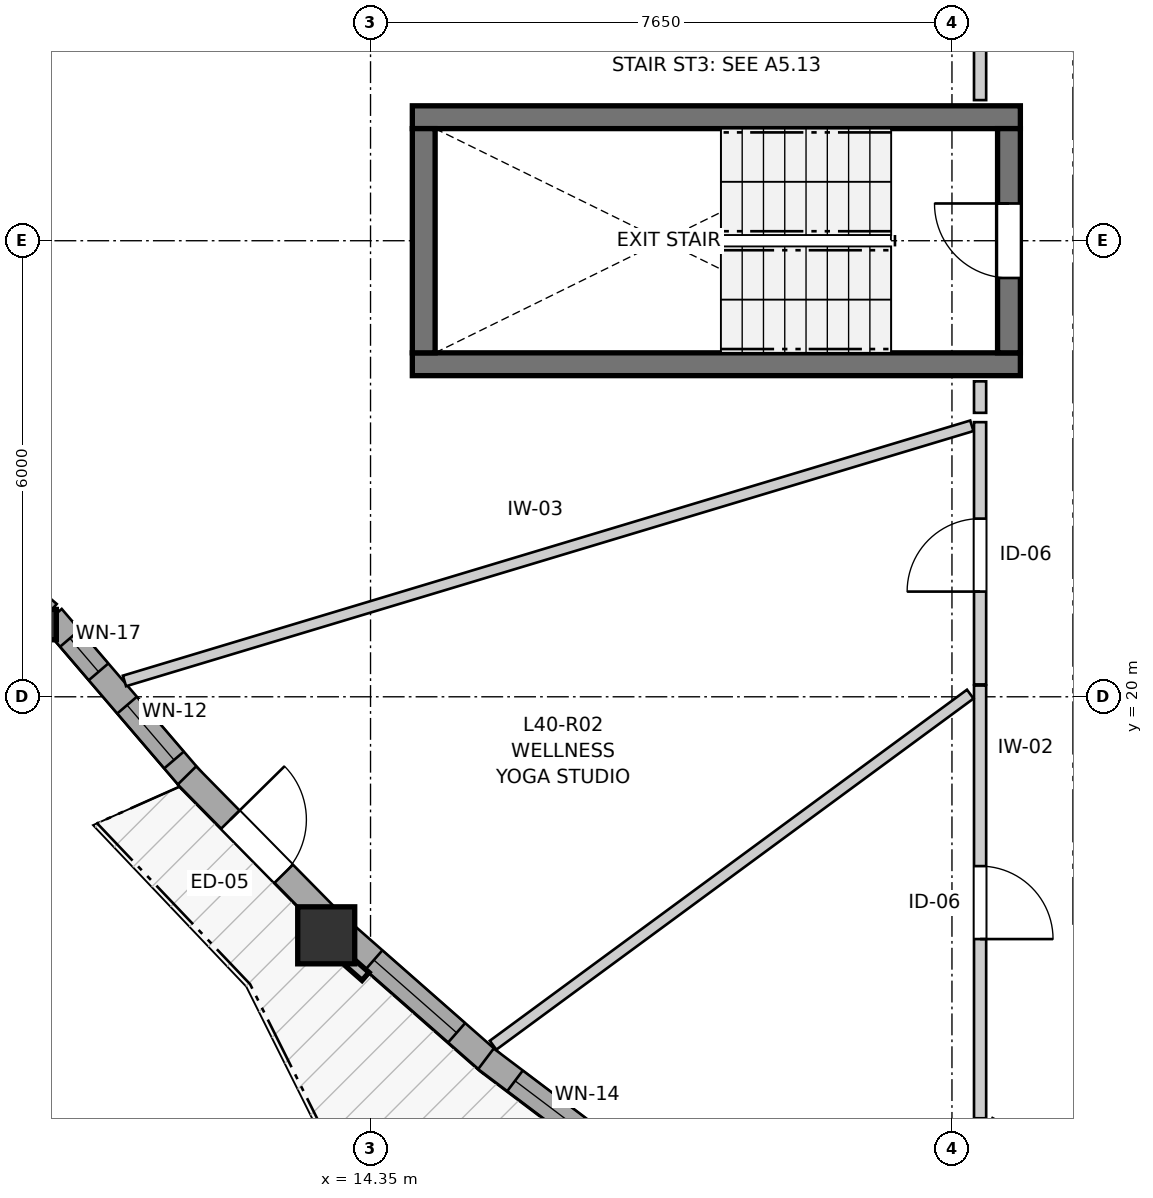
"""IFC4 building model, lengths in metres.
Left out: names, types, materials, properties, quantities, classifications, styles, units other than length and angle.
Written with IfcOpenShell. Run it as: python <this file> out.ifc"""

import sys

from ifc_helpers import new_model, si_unit, direction, frame, frame_2d, origin, origin_2d, place, context, subcontext, project, spatial, rectangle, i_section, extrude, source, transform, mapped, element, fill, save


model = new_model("IFC4")
c1 = context("Model", 3, precision=1e-05, world=origin(), true_north=direction((0.0, 1.0)))
c2 = subcontext(c1, "Body", "Model", "MODEL_VIEW")
j1 = project(units=[si_unit("LENGTHUNIT", "METRE"), si_unit("PLANEANGLEUNIT", "RADIAN")], contexts=[c1])
p1 = place(None, origin())
s1 = spatial("IfcSite", under=j1, at=p1, CompositionType="ELEMENT")
p2 = place(p1, origin())
s2 = spatial("IfcBuilding", under=s1, at=p2, CompositionType="ELEMENT")
p3 = place(p2, frame((0.0, 0.0, 136.2)))
s3 = spatial("IfcBuildingStorey", under=s2, at=p3, CompositionType="ELEMENT", Elevation=136.2)
for number, where, z_axis, x_axis in (
    (1, (14.9, 24.375, 0.0), (0.0, 0.0, 1.0), (1.0, 0.0, 0.0)),
    (2, (22.9, 27.625, 0.0), (0.0, 0.0, 1.0), (-1.0, 0.0, 0.0)),
):
    element("IfcWall", number, at=place(p3, frame(where, z_axis=z_axis, x_axis=x_axis)), inside=s3, PredefinedType="SHEAR", context=c2, shape_type="SweptSolid", body=[
        extrude(rectangle(XDim=8.0, YDim=0.3, at=frame_2d((4.0, 0.0))), origin(), (0.0, 0.0, 1.0), 2.95),
    ])
p4 = place(p3, frame((15.05, 27.475, 0.0), z_axis=(0.0, 0.0, 1.0), x_axis=(0.0, -1.0, 0.0)))
e3 = element("IfcWall", 3, at=p4, inside=s3, PredefinedType="SHEAR", context=c2, shape_type="SweptSolid", body=[
    extrude(rectangle(XDim=2.95, YDim=0.3, at=frame_2d((1.475, 0.0))), origin(), (0.0, 0.0, 1.0), 2.95),
])
p5 = place(p3, frame((22.75, 24.525, 0.0), z_axis=(0.0, 0.0, 1.0), x_axis=(0.0, 1.0, 0.0)))
e4 = element("IfcWall", 4, at=p5, inside=s3, PredefinedType="SHEAR", context=c2, shape_type="SweptSolid", body=[
    extrude(rectangle(XDim=2.95, YDim=0.3, at=frame_2d((1.475, 0.0))), origin(), (0.0, 0.0, 1.0), 2.95),
])
p6 = place(p5, frame((0.985, 0.0, 0.0)))
e5 = element("IfcOpeningElement", 5, at=p6, cuts=e4, PredefinedType="OPENING", context=c2, shape_type="SweptSolid", body=[
    extrude(rectangle(XDim=0.98, YDim=2.15, at=frame_2d((0.49, 1.075))), frame((0.0, 0.16, 0.0), z_axis=(0.0, -1.0, 0.0), x_axis=(1.0, 0.0, 0.0)), (0.0, 0.0, 1.0), 0.32),
])
m1 = source(origin(), c2, "Body", "SweptSolid", [
    extrude(i_section(OverallWidth=0.401, OverallDepth=0.399, WebThickness=0.023, FlangeThickness=0.036, FilletRadius=0.015, at=origin_2d()), origin(), (0.0, 0.0, 1.0), 2.95),
])
p7 = place(p3, frame((10.016, 20.95, 0.0), z_axis=(0.0, 0.0, 1.0), x_axis=(1.0, 0.0, 0.0)))
e6 = element("IfcColumn", 6, at=p7, inside=s3, PredefinedType="PILASTER", context=c2, shape_type="MappedRepresentation", body=[
    mapped(m1, transform((0.0, 0.0, 0.0), x_axis=(1.0, 0.0, 0.0), y_axis=(0.0, 1.0, 0.0), z_axis=(0.0, 0.0, 1.0), scale=1.0)),
])
m2 = source(origin(), c2, "Body", "SweptSolid", [
    extrude(rectangle(XDim=0.75, YDim=0.75, at=origin_2d()), origin(), (0.0, 0.0, 1.0), 2.95),
])
p8 = place(p3, frame((13.767, 16.862, 0.0), z_axis=(0.0, 0.0, 1.0), x_axis=(1.0, 0.0, 0.0)))
e7 = element("IfcColumn", 7, at=p8, inside=s3, PredefinedType="COLUMN", context=c2, shape_type="MappedRepresentation", body=[
    mapped(m2, transform((0.0, 0.0, 0.0), x_axis=(1.0, 0.0, 0.0), y_axis=(0.0, 1.0, 0.0), z_axis=(0.0, 0.0, 1.0), scale=1.0)),
])
p9 = place(p3, frame((8.573, 22.406, 0.0), z_axis=(0.0, 0.0, 1.0), x_axis=(0.760379886087, -0.649478582276, 0.0)))
e8 = element("IfcWall", 8, at=p9, inside=s3, PredefinedType="SOLIDWALL", context=c2, shape_type="SweptSolid", body=[
    extrude(rectangle(XDim=2.023, YDim=0.34, at=frame_2d((1.012, 0.0))), origin(), (0.0, 0.0, 1.0), 2.53),
])
p10 = place(p9, frame((0.322, 0.0, 0.82)))
e9 = element("IfcOpeningElement", 9, at=p10, cuts=e8, PredefinedType="OPENING", context=c2, shape_type="SweptSolid", body=[
    extrude(rectangle(XDim=1.4, YDim=1.35, at=frame_2d((0.7, 0.675))), frame((0.0, 0.18, 0.0), z_axis=(0.0, -1.0, 0.0), x_axis=(1.0, 0.0, 0.0)), (0.0, 0.0, 1.0), 0.36),
])
p11 = place(p3, frame((10.158, 21.045, 0.0), z_axis=(0.0, 0.0, 1.0), x_axis=(0.650385352329, -0.759604432238, 0.0)))
e10 = element("IfcWall", 10, at=p11, inside=s3, PredefinedType="SOLIDWALL", context=c2, shape_type="SweptSolid", body=[
    extrude(rectangle(XDim=2.823, YDim=0.34, at=frame_2d((1.412, 0.0))), origin(), (0.0, 0.0, 1.0), 2.53),
])
p12 = place(p11, frame((0.364, 0.0, 0.82)))
e11 = element("IfcOpeningElement", 11, at=p12, cuts=e10, PredefinedType="OPENING", context=c2, shape_type="SweptSolid", body=[
    extrude(rectangle(XDim=0.58, YDim=1.35, at=frame_2d((0.29, 0.675))), frame((0.0, 0.18, 0.0), z_axis=(0.0, -1.0, 0.0), x_axis=(1.0, 0.0, 0.0)), (0.0, 0.0, 1.0), 0.36),
])
p13 = place(p11, frame((1.52, 0.0, 0.82)))
e12 = element("IfcOpeningElement", 12, at=p13, cuts=e10, PredefinedType="OPENING", context=c2, shape_type="SweptSolid", body=[
    extrude(rectangle(XDim=0.95, YDim=1.35, at=frame_2d((0.475, 0.675))), frame((0.0, 0.18, 0.0), z_axis=(0.0, -1.0, 0.0), x_axis=(1.0, 0.0, 0.0)), (0.0, 0.0, 1.0), 0.36),
])
p14 = place(p3, frame((11.935, 18.965, 0.0), z_axis=(0.0, 0.0, 1.0), x_axis=(0.701560003197, -0.712610385775, 0.0)))
e13 = element("IfcWall", 13, at=p14, inside=s3, PredefinedType="SOLIDWALL", context=c2, shape_type="SweptSolid", body=[
    extrude(rectangle(XDim=2.629, YDim=0.34, at=frame_2d((1.314, 0.0))), origin(), (0.0, 0.0, 1.0), 2.53),
])
p15 = place(p14, frame((0.815, 0.0, 0.0)))
e14 = element("IfcOpeningElement", 14, at=p15, cuts=e13, PredefinedType="OPENING", context=c2, shape_type="SweptSolid", body=[
    extrude(rectangle(XDim=1.0, YDim=2.1, at=frame_2d((0.5, 1.05))), frame((0.0, 0.18, 0.0), z_axis=(0.0, -1.0, 0.0), x_axis=(1.0, 0.0, 0.0)), (0.0, 0.0, 1.0), 0.36),
])
p16 = place(p3, frame((13.996, 16.887, 0.0), z_axis=(0.0, 0.0, 1.0), x_axis=(0.75116489845, -0.660114607729, 0.0)))
e15 = element("IfcWall", 15, at=p16, inside=s3, PredefinedType="SOLIDWALL", context=c2, shape_type="SweptSolid", body=[
    extrude(rectangle(XDim=2.585, YDim=0.34, at=frame_2d((1.292, 0.0))), origin(), (0.0, 0.0, 1.0), 2.53),
])
p17 = place(p16, frame((0.531, 0.0, 0.82)))
e16 = element("IfcOpeningElement", 16, at=p17, cuts=e15, PredefinedType="OPENING", context=c2, shape_type="SweptSolid", body=[
    extrude(rectangle(XDim=1.45, YDim=1.25, at=frame_2d((0.725, 0.625))), frame((0.0, 0.18, 0.0), z_axis=(0.0, -1.0, 0.0), x_axis=(1.0, 0.0, 0.0)), (0.0, 0.0, 1.0), 0.36),
])
p18 = place(p3, frame((15.868, 15.237, 0.0), z_axis=(0.0, 0.0, 1.0), x_axis=(0.798078784288, -0.602553113069, 0.0)))
e17 = element("IfcWall", 17, at=p18, inside=s3, PredefinedType="SOLIDWALL", context=c2, shape_type="SweptSolid", body=[
    extrude(rectangle(XDim=2.689, YDim=0.34, at=frame_2d((1.345, 0.0))), origin(), (0.0, 0.0, 1.0), 2.53),
])
p19 = place(p18, frame((0.48, 0.0, 0.82)))
e18 = element("IfcOpeningElement", 18, at=p19, cuts=e17, PredefinedType="OPENING", context=c2, shape_type="SweptSolid", body=[
    extrude(rectangle(XDim=1.75, YDim=1.3, at=frame_2d((0.875, 0.65))), frame((0.0, 0.18, 0.0), z_axis=(0.0, -1.0, 0.0), x_axis=(1.0, 0.0, 0.0)), (0.0, 0.0, 1.0), 0.36),
])
p20 = place(p3, frame((22.37, 20.148, 0.0), z_axis=(0.0, 0.0, 1.0), x_axis=(0.0, -1.0, 0.0)))
e19 = element("IfcWall", 19, at=p20, inside=s3, PredefinedType="PARTITIONING", context=c2, shape_type="SweptSolid", body=[
    extrude(rectangle(XDim=5.693, YDim=0.16, at=frame_2d((2.846, 0.0))), origin(), (0.0, 0.0, 1.0), 2.95),
])
p21 = place(p20, frame((2.375, 0.0, 0.0)))
e20 = element("IfcOpeningElement", 20, at=p21, cuts=e19, PredefinedType="OPENING", context=c2, shape_type="SweptSolid", body=[
    extrude(rectangle(XDim=0.96, YDim=2.1, at=frame_2d((0.48, 1.05))), frame((0.0, 0.09, 0.0), z_axis=(0.0, -1.0, 0.0), x_axis=(1.0, 0.0, 0.0)), (0.0, 0.0, 1.0), 0.18),
])
p22 = place(p3, frame((22.37, 27.85, 0.0), z_axis=(0.0, 0.0, 1.0), x_axis=(0.0, 1.0, 0.0)))
e21 = element("IfcWall", 21, at=p22, inside=s3, PredefinedType="PARTITIONING", context=c2, shape_type="SweptSolid", body=[
    extrude(rectangle(XDim=3.658, YDim=0.16, at=frame_2d((1.829, 0.0))), origin(), (0.0, 0.0, 1.0), 2.95),
])
p23 = place(p22, frame((1.369, 0.0, 0.0)))
e22 = element("IfcOpeningElement", 22, at=p23, cuts=e21, PredefinedType="OPENING", context=c2, shape_type="SweptSolid", body=[
    extrude(rectangle(XDim=0.96, YDim=2.1, at=frame_2d((0.48, 1.05))), frame((0.0, 0.09, 0.0), z_axis=(0.0, -1.0, 0.0), x_axis=(1.0, 0.0, 0.0)), (0.0, 0.0, 1.0), 0.18),
])
p24 = place(p3, frame((22.37, 20.163, 0.0), z_axis=(0.0, 0.0, 1.0), x_axis=(0.0, 1.0, 0.0)))
e23 = element("IfcWall", 23, at=p24, inside=s3, PredefinedType="PARTITIONING", context=c2, shape_type="SweptSolid", body=[
    extrude(rectangle(XDim=3.45, YDim=0.16, at=frame_2d((1.725, 0.0))), origin(), (0.0, 0.0, 1.0), 2.95),
])
p25 = place(p24, frame((1.221, 0.0, 0.0)))
e24 = element("IfcOpeningElement", 24, at=p25, cuts=e23, PredefinedType="OPENING", context=c2, shape_type="SweptSolid", body=[
    extrude(rectangle(XDim=0.96, YDim=2.1, at=frame_2d((0.48, 1.05))), frame((0.0, 0.09, 0.0), z_axis=(0.0, -1.0, 0.0), x_axis=(1.0, 0.0, 0.0)), (0.0, 0.0, 1.0), 0.18),
])
p26 = place(p3, frame((11.113, 20.208, 0.0), z_axis=(0.0, 0.0, 1.0), x_axis=(0.957541878855, 0.288294207778, 0.0)))
e25 = element("IfcWall", 25, at=p26, inside=s3, PredefinedType="PARTITIONING", context=c2, shape_type="SweptSolid", body=[
    extrude(rectangle(XDim=11.643, YDim=0.145, at=frame_2d((5.822, 0.0))), origin(), (0.0, 0.0, 1.0), 2.95),
])
p27 = place(p3, frame((15.962, 15.416, 0.0), z_axis=(0.0, 0.0, 1.0), x_axis=(0.805487856374, 0.59261227901, 0.0)))
e26 = element("IfcWall", 26, at=p27, inside=s3, PredefinedType="PARTITIONING", context=c2, shape_type="SweptSolid", body=[
    extrude(rectangle(XDim=7.794, YDim=0.145, at=frame_2d((3.897, 0.0))), origin(), (0.0, 0.0, 1.0), 2.95),
])
p28 = place(p3, frame((22.495, 14.387, 0.0), z_axis=(0.0, 0.0, 1.0), x_axis=(0.879618674253, -0.475679501245, 0.0)))
e27 = element("IfcWall", 27, at=p28, inside=s3, PredefinedType="PARTITIONING", context=c2, shape_type="SweptSolid", body=[
    extrude(rectangle(XDim=1.603, YDim=0.16, at=frame_2d((0.801, 0.0))), origin(), (0.0, 0.0, 1.0), 2.95),
])
p29 = place(p3, frame((22.37, 23.736, 0.0), z_axis=(0.0, 0.0, 1.0), x_axis=(0.0, 1.0, 0.0)))
e28 = element("IfcWall", 28, at=p29, inside=s3, PredefinedType="PARTITIONING", context=c2, shape_type="SweptSolid", body=[
    extrude(rectangle(XDim=0.414, YDim=0.16, at=frame_2d((0.207, 0.0))), origin(), (0.0, 0.0, 1.0), 2.95),
])
m3 = source(origin(), c2, "Body", "SweptSolid", [
    extrude(rectangle(XDim=0.58, YDim=1.35, at=frame_2d((0.29, 0.675))), frame((0.0, 0.03, 0.0), z_axis=(0.0, -1.0, 0.0), x_axis=(1.0, 0.0, 0.0)), (0.0, 0.0, 1.0), 0.06),
])
p30 = place(p12, origin())
e29 = element("IfcWindow", 29, at=p30, inside=s3, PartitioningType="SINGLE_PANEL", PredefinedType="WINDOW", context=c2, shape_type="MappedRepresentation", body=[
    mapped(m3, transform((0.0, 0.0, 0.0), x_axis=(1.0, 0.0, 0.0), y_axis=(0.0, 1.0, 0.0), z_axis=(0.0, 0.0, 1.0), scale=1.0)),
])
fill(e11, e29)
m4 = source(origin(), c2, "Body", "SweptSolid", [
    extrude(rectangle(XDim=0.95, YDim=1.35, at=frame_2d((0.475, 0.675))), frame((0.0, 0.03, 0.0), z_axis=(0.0, -1.0, 0.0), x_axis=(1.0, 0.0, 0.0)), (0.0, 0.0, 1.0), 0.06),
])
p31 = place(p13, origin())
e30 = element("IfcWindow", 30, at=p31, inside=s3, PartitioningType="SINGLE_PANEL", PredefinedType="WINDOW", context=c2, shape_type="MappedRepresentation", body=[
    mapped(m4, transform((0.0, 0.0, 0.0), x_axis=(1.0, 0.0, 0.0), y_axis=(0.0, 1.0, 0.0), z_axis=(0.0, 0.0, 1.0), scale=1.0)),
])
fill(e12, e30)
m5 = source(origin(), c2, "Body", "SweptSolid", [
    extrude(rectangle(XDim=1.45, YDim=1.25, at=frame_2d((0.725, 0.625))), frame((0.0, 0.03, 0.0), z_axis=(0.0, -1.0, 0.0), x_axis=(1.0, 0.0, 0.0)), (0.0, 0.0, 1.0), 0.06),
])
p32 = place(p17, origin())
e31 = element("IfcWindow", 31, at=p32, inside=s3, PartitioningType="SINGLE_PANEL", PredefinedType="WINDOW", context=c2, shape_type="MappedRepresentation", body=[
    mapped(m5, transform((0.0, 0.0, 0.0), x_axis=(1.0, 0.0, 0.0), y_axis=(0.0, 1.0, 0.0), z_axis=(0.0, 0.0, 1.0), scale=1.0)),
])
fill(e16, e31)
m6 = source(origin(), c2, "Body", "SweptSolid", [
    extrude(rectangle(XDim=1.75, YDim=1.3, at=frame_2d((0.875, 0.65))), frame((0.0, 0.03, 0.0), z_axis=(0.0, -1.0, 0.0), x_axis=(1.0, 0.0, 0.0)), (0.0, 0.0, 1.0), 0.06),
])
p33 = place(p19, origin())
e32 = element("IfcWindow", 32, at=p33, inside=s3, PartitioningType="SINGLE_PANEL", PredefinedType="WINDOW", context=c2, shape_type="MappedRepresentation", body=[
    mapped(m6, transform((0.0, 0.0, 0.0), x_axis=(1.0, 0.0, 0.0), y_axis=(0.0, 1.0, 0.0), z_axis=(0.0, 0.0, 1.0), scale=1.0)),
])
fill(e18, e32)
m7 = source(origin(), c2, "Body", "SweptSolid", [
    extrude(rectangle(XDim=1.0, YDim=2.1, at=frame_2d((0.5, 1.05))), frame((0.0, 0.025, 0.0), z_axis=(0.0, -1.0, 0.0), x_axis=(1.0, 0.0, 0.0)), (0.0, 0.0, 1.0), 0.05),
])
p34 = place(p15, origin())
e33 = element("IfcDoor", 33, at=p34, inside=s3, OperationType="SINGLE_SWING_LEFT", PredefinedType="DOOR", context=c2, shape_type="MappedRepresentation", body=[
    mapped(m7, transform((0.0, 0.0, 0.0), x_axis=(1.0, 0.0, 0.0), y_axis=(0.0, 1.0, 0.0), z_axis=(0.0, 0.0, 1.0), scale=1.0)),
])
fill(e14, e33)
m8 = source(origin(), c2, "Body", "SweptSolid", [
    extrude(rectangle(XDim=0.98, YDim=2.15, at=frame_2d((0.49, 1.075))), frame((0.0, 0.025, 0.0), z_axis=(0.0, -1.0, 0.0), x_axis=(1.0, 0.0, 0.0)), (0.0, 0.0, 1.0), 0.05),
])
p35 = place(p6, origin())
e34 = element("IfcDoor", 34, at=p35, inside=s3, OperationType="SINGLE_SWING_RIGHT", PredefinedType="DOOR", context=c2, shape_type="MappedRepresentation", body=[
    mapped(m8, transform((0.0, 0.0, 0.0), x_axis=(1.0, 0.0, 0.0), y_axis=(0.0, 1.0, 0.0), z_axis=(0.0, 0.0, 1.0), scale=1.0)),
])
fill(e5, e34)
m9 = source(origin(), c2, "Body", "SweptSolid", [
    extrude(rectangle(XDim=0.96, YDim=2.1, at=frame_2d((0.48, 1.05))), frame((0.0, 0.025, 0.0), z_axis=(0.0, -1.0, 0.0), x_axis=(1.0, 0.0, 0.0)), (0.0, 0.0, 1.0), 0.05),
])
p36 = place(p21, origin())
e35 = element("IfcDoor", 35, at=p36, inside=s3, OperationType="SINGLE_SWING_RIGHT", PredefinedType="DOOR", context=c2, shape_type="MappedRepresentation", body=[
    mapped(m9, transform((0.0, 0.0, 0.0), x_axis=(1.0, 0.0, 0.0), y_axis=(0.0, 1.0, 0.0), z_axis=(0.0, 0.0, 1.0), scale=1.0)),
])
fill(e20, e35)
p37 = place(p25, origin())
e36 = element("IfcDoor", 36, at=p37, inside=s3, OperationType="SINGLE_SWING_LEFT", PredefinedType="DOOR", context=c2, shape_type="MappedRepresentation", body=[
    mapped(m9, transform((0.0, 0.0, 0.0), x_axis=(1.0, 0.0, 0.0), y_axis=(0.0, 1.0, 0.0), z_axis=(0.0, 0.0, 1.0), scale=1.0)),
])
fill(e24, e36)
save(model, sys.argv[1])
